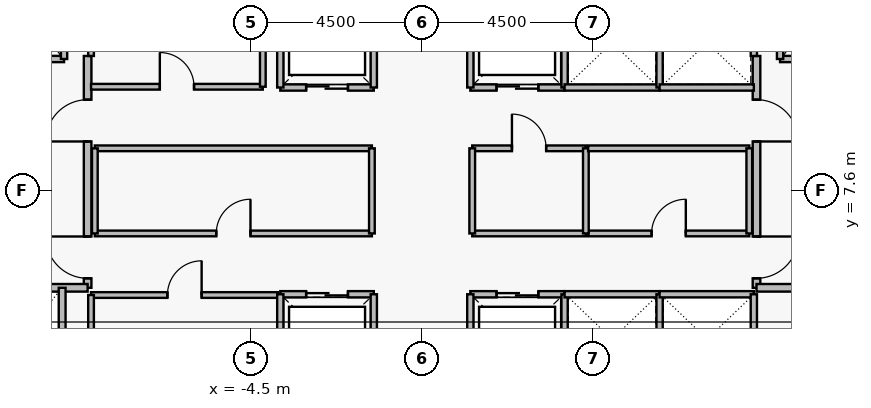
"""IFC4 building model, lengths in metres.
Left out: names, types, materials, properties, quantities, classifications, styles, units other than length and angle.
Written with IfcOpenShell. Run it as: python <this file> out.ifc"""

import sys

from ifc_helpers import new_model, si_unit, direction, frame, frame_2d, origin, place, context, subcontext, project, spatial, rectangle, extrude, element, fill, save


model = new_model("IFC4")
c1 = context("Model", 3, precision=1e-05, world=origin(), true_north=direction((0.0, 1.0)))
c2 = subcontext(c1, "Body", "Model", "MODEL_VIEW")
j1 = project(units=[si_unit("LENGTHUNIT", "METRE"), si_unit("PLANEANGLEUNIT", "RADIAN")], contexts=[c1])
p1 = place(None, origin())
s1 = spatial("IfcSite", under=j1, at=p1, CompositionType="ELEMENT")
p2 = place(p1, origin())
s2 = spatial("IfcBuilding", under=s1, at=p2, CompositionType="ELEMENT")
p3 = place(p2, frame((0.0, 0.0, 214.9)))
s3 = spatial("IfcBuildingStorey", under=s2, at=p3, CompositionType="ELEMENT", Elevation=214.9)
p4 = place(p3, frame((-8.8, 5.05, 0.0), z_axis=(0.0, 0.0, 1.0), x_axis=(0.0, 1.0, 0.0)))
e1 = element("IfcWall", 1, at=p4, inside=s3, PredefinedType="PARTITIONING", context=c2, shape_type="SweptSolid", body=[
    extrude(rectangle(XDim=6.1, YDim=0.2, at=frame_2d((3.05, 0.0))), origin(), (0.0, 0.0, 1.0), 3.53),
])
p5 = place(p4, frame((0.25, 0.0, 0.0)))
e2 = element("IfcOpeningElement", 2, at=p5, cuts=e1, PredefinedType="OPENING", context=c2, shape_type="SweptSolid", body=[
    extrude(rectangle(XDim=1.1, YDim=2.2, at=frame_2d((0.55, 1.1))), frame((0.0, 0.11, 0.0), z_axis=(0.0, -1.0, 0.0), x_axis=(1.0, 0.0, 0.0)), (0.0, 0.0, 1.0), 0.22),
])
p6 = place(p4, frame((3.85, 0.0, 0.0)))
e3 = element("IfcOpeningElement", 3, at=p6, cuts=e1, PredefinedType="OPENING", context=c2, shape_type="SweptSolid", body=[
    extrude(rectangle(XDim=1.1, YDim=2.2, at=frame_2d((0.55, 1.1))), frame((0.0, 0.11, 0.0), z_axis=(0.0, -1.0, 0.0), x_axis=(1.0, 0.0, 0.0)), (0.0, 0.0, 1.0), 0.22),
])
p7 = place(p3, frame((8.8, 11.15, 0.0), z_axis=(0.0, 0.0, 1.0), x_axis=(0.0, -1.0, 0.0)))
e4 = element("IfcWall", 4, at=p7, inside=s3, PredefinedType="PARTITIONING", context=c2, shape_type="SweptSolid", body=[
    extrude(rectangle(XDim=6.1, YDim=0.2, at=frame_2d((3.05, 0.0))), origin(), (0.0, 0.0, 1.0), 3.53),
])
p8 = place(p7, frame((1.15, 0.0, 0.0)))
e5 = element("IfcOpeningElement", 5, at=p8, cuts=e4, PredefinedType="OPENING", context=c2, shape_type="SweptSolid", body=[
    extrude(rectangle(XDim=1.1, YDim=2.2, at=frame_2d((0.55, 1.1))), frame((0.0, 0.11, 0.0), z_axis=(0.0, -1.0, 0.0), x_axis=(1.0, 0.0, 0.0)), (0.0, 0.0, 1.0), 0.22),
])
p9 = place(p7, frame((4.75, 0.0, 0.0)))
e6 = element("IfcOpeningElement", 6, at=p9, cuts=e4, PredefinedType="OPENING", context=c2, shape_type="SweptSolid", body=[
    extrude(rectangle(XDim=1.1, YDim=2.2, at=frame_2d((0.55, 1.1))), frame((0.0, 0.11, 0.0), z_axis=(0.0, -1.0, 0.0), x_axis=(1.0, 0.0, 0.0)), (0.0, 0.0, 1.0), 0.22),
])
p10 = place(p3, frame((-11.58, 11.07, 0.0), z_axis=(0.0, 0.0, 1.0), x_axis=(1.0, 0.0, 0.0)))
e7 = element("IfcWall", 7, at=p10, inside=s3, PredefinedType="PARTITIONING", context=c2, shape_type="SweptSolid", body=[
    extrude(rectangle(XDim=2.16, YDim=0.165, at=frame_2d((1.08, 0.0))), origin(), (0.0, 0.0, 1.0), 3.53),
])
p11 = place(p10, frame((0.53, 0.0, 0.0)))
e8 = element("IfcOpeningElement", 8, at=p11, cuts=e7, PredefinedType="OPENING", context=c2, shape_type="SweptSolid", body=[
    extrude(rectangle(XDim=1.15, YDim=2.25, at=frame_2d((0.575, 1.125))), frame((0.0, 0.093, 0.0), z_axis=(0.0, -1.0, 0.0), x_axis=(1.0, 0.0, 0.0)), (0.0, 0.0, 1.0), 0.185),
])
p12 = place(p3, frame((9.42, 11.07, 0.0), z_axis=(0.0, 0.0, 1.0), x_axis=(1.0, 0.0, 0.0)))
e9 = element("IfcWall", 9, at=p12, inside=s3, PredefinedType="PARTITIONING", context=c2, shape_type="SweptSolid", body=[
    extrude(rectangle(XDim=2.16, YDim=0.165, at=frame_2d((1.08, 0.0))), origin(), (0.0, 0.0, 1.0), 3.53),
])
p13 = place(p12, frame((0.53, 0.0, 0.0)))
e10 = element("IfcOpeningElement", 10, at=p13, cuts=e9, PredefinedType="OPENING", context=c2, shape_type="SweptSolid", body=[
    extrude(rectangle(XDim=1.15, YDim=2.25, at=frame_2d((0.575, 1.125))), frame((0.0, 0.093, 0.0), z_axis=(0.0, -1.0, 0.0), x_axis=(1.0, 0.0, 0.0)), (0.0, 0.0, 1.0), 0.185),
])
p14 = place(p3, frame((-3.73, 4.88, 0.0), z_axis=(0.0, 0.0, 1.0), x_axis=(1.0, 0.0, 0.0)))
e11 = element("IfcWall", 11, at=p14, inside=s3, PredefinedType="PARTITIONING", context=c2, shape_type="SweptSolid", body=[
    extrude(rectangle(XDim=2.46, YDim=0.165, at=frame_2d((1.23, 0.0))), origin(), (0.0, 0.0, 1.0), 3.53),
])
p15 = place(p14, frame((0.68, 0.0, 0.0)))
e12 = element("IfcOpeningElement", 12, at=p15, cuts=e11, PredefinedType="OPENING", context=c2, shape_type="SweptSolid", body=[
    extrude(rectangle(XDim=1.1, YDim=2.25, at=frame_2d((0.55, 1.125))), frame((0.0, 0.093, 0.0), z_axis=(0.0, -1.0, 0.0), x_axis=(1.0, 0.0, 0.0)), (0.0, 0.0, 1.0), 0.185),
])
p16 = place(p3, frame((1.27, 4.88, 0.0), z_axis=(0.0, 0.0, 1.0), x_axis=(1.0, 0.0, 0.0)))
e13 = element("IfcWall", 13, at=p16, inside=s3, PredefinedType="PARTITIONING", context=c2, shape_type="SweptSolid", body=[
    extrude(rectangle(XDim=2.48, YDim=0.165, at=frame_2d((1.24, 0.0))), origin(), (0.0, 0.0, 1.0), 3.53),
])
p17 = place(p16, frame((0.69, 0.0, 0.0)))
e14 = element("IfcOpeningElement", 14, at=p17, cuts=e13, PredefinedType="OPENING", context=c2, shape_type="SweptSolid", body=[
    extrude(rectangle(XDim=1.1, YDim=2.25, at=frame_2d((0.55, 1.125))), frame((0.0, 0.093, 0.0), z_axis=(0.0, -1.0, 0.0), x_axis=(1.0, 0.0, 0.0)), (0.0, 0.0, 1.0), 0.185),
])
p18 = place(p3, frame((-3.73, 10.32, 0.0), z_axis=(0.0, 0.0, 1.0), x_axis=(1.0, 0.0, 0.0)))
e15 = element("IfcWall", 15, at=p18, inside=s3, PredefinedType="PARTITIONING", context=c2, shape_type="SweptSolid", body=[
    extrude(rectangle(XDim=2.46, YDim=0.165, at=frame_2d((1.23, 0.0))), origin(), (0.0, 0.0, 1.0), 3.53),
])
p19 = place(p18, frame((0.68, 0.0, 0.0)))
e16 = element("IfcOpeningElement", 16, at=p19, cuts=e15, PredefinedType="OPENING", context=c2, shape_type="SweptSolid", body=[
    extrude(rectangle(XDim=1.1, YDim=2.25, at=frame_2d((0.55, 1.125))), frame((0.0, 0.093, 0.0), z_axis=(0.0, -1.0, 0.0), x_axis=(1.0, 0.0, 0.0)), (0.0, 0.0, 1.0), 0.185),
])
p20 = place(p3, frame((1.27, 10.32, 0.0), z_axis=(0.0, 0.0, 1.0), x_axis=(1.0, 0.0, 0.0)))
e17 = element("IfcWall", 17, at=p20, inside=s3, PredefinedType="PARTITIONING", context=c2, shape_type="SweptSolid", body=[
    extrude(rectangle(XDim=2.48, YDim=0.165, at=frame_2d((1.24, 0.0))), origin(), (0.0, 0.0, 1.0), 3.53),
])
p21 = place(p20, frame((0.69, 0.0, 0.0)))
e18 = element("IfcOpeningElement", 18, at=p21, cuts=e17, PredefinedType="OPENING", context=c2, shape_type="SweptSolid", body=[
    extrude(rectangle(XDim=1.1, YDim=2.25, at=frame_2d((0.55, 1.125))), frame((0.0, 0.093, 0.0), z_axis=(0.0, -1.0, 0.0), x_axis=(1.0, 0.0, 0.0)), (0.0, 0.0, 1.0), 0.185),
])
p22 = place(p3, frame((-8.71, 4.86, 0.0), z_axis=(0.0, 0.0, 1.0), x_axis=(1.0, 0.0, 0.0)))
e19 = element("IfcWall", 19, at=p22, inside=s3, PredefinedType="PARTITIONING", context=c2, shape_type="SweptSolid", body=[
    extrude(rectangle(XDim=4.92, YDim=0.15, at=frame_2d((2.46, 0.0))), origin(), (0.0, 0.0, 1.0), 3.53),
])
p23 = place(p22, frame((2.01, 0.0, 0.0)))
e20 = element("IfcOpeningElement", 20, at=p23, cuts=e19, PredefinedType="OPENING", context=c2, shape_type="SweptSolid", body=[
    extrude(rectangle(XDim=0.9, YDim=2.15, at=frame_2d((0.45, 1.075))), frame((0.0, 0.085, 0.0), z_axis=(0.0, -1.0, 0.0), x_axis=(1.0, 0.0, 0.0)), (0.0, 0.0, 1.0), 0.17),
])
p24 = place(p3, frame((-8.71, 10.34, 0.0), z_axis=(0.0, 0.0, 1.0), x_axis=(1.0, 0.0, 0.0)))
e21 = element("IfcWall", 21, at=p24, inside=s3, PredefinedType="PARTITIONING", context=c2, shape_type="SweptSolid", body=[
    extrude(rectangle(XDim=4.52, YDim=0.15, at=frame_2d((2.26, 0.0))), origin(), (0.0, 0.0, 1.0), 3.53),
])
p25 = place(p24, frame((1.81, 0.0, 0.0)))
e22 = element("IfcOpeningElement", 22, at=p25, cuts=e21, PredefinedType="OPENING", context=c2, shape_type="SweptSolid", body=[
    extrude(rectangle(XDim=0.9, YDim=2.15, at=frame_2d((0.45, 1.075))), frame((0.0, 0.085, 0.0), z_axis=(0.0, -1.0, 0.0), x_axis=(1.0, 0.0, 0.0)), (0.0, 0.0, 1.0), 0.17),
])
p26 = place(p3, frame((-8.61, 6.48, 0.0), z_axis=(0.0, 0.0, 1.0), x_axis=(1.0, 0.0, 0.0)))
e23 = element("IfcWall", 23, at=p26, inside=s3, PredefinedType="PARTITIONING", context=c2, shape_type="SweptSolid", body=[
    extrude(rectangle(XDim=7.29, YDim=0.15, at=frame_2d((3.645, 0.0))), origin(), (0.0, 0.0, 1.0), 3.53),
])
p27 = place(p26, frame((3.195, 0.0, 0.0)))
e24 = element("IfcOpeningElement", 24, at=p27, cuts=e23, PredefinedType="OPENING", context=c2, shape_type="SweptSolid", body=[
    extrude(rectangle(XDim=0.9, YDim=2.15, at=frame_2d((0.45, 1.075))), frame((0.0, 0.085, 0.0), z_axis=(0.0, -1.0, 0.0), x_axis=(1.0, 0.0, 0.0)), (0.0, 0.0, 1.0), 0.17),
])
p28 = place(p3, frame((1.32, 8.72, 0.0), z_axis=(0.0, 0.0, 1.0), x_axis=(1.0, 0.0, 0.0)))
e25 = element("IfcWall", 25, at=p28, inside=s3, PredefinedType="PARTITIONING", context=c2, shape_type="SweptSolid", body=[
    extrude(rectangle(XDim=2.99, YDim=0.15, at=frame_2d((1.495, 0.0))), origin(), (0.0, 0.0, 1.0), 3.53),
])
p29 = place(p28, frame((1.045, 0.0, 0.0)))
e26 = element("IfcOpeningElement", 26, at=p29, cuts=e25, PredefinedType="OPENING", context=c2, shape_type="SweptSolid", body=[
    extrude(rectangle(XDim=0.9, YDim=2.15, at=frame_2d((0.45, 1.075))), frame((0.0, 0.085, 0.0), z_axis=(0.0, -1.0, 0.0), x_axis=(1.0, 0.0, 0.0)), (0.0, 0.0, 1.0), 0.17),
])
p30 = place(p3, frame((4.37, 6.48, 0.0), z_axis=(0.0, 0.0, 1.0), x_axis=(1.0, 0.0, 0.0)))
e27 = element("IfcWall", 27, at=p30, inside=s3, PredefinedType="PARTITIONING", context=c2, shape_type="SweptSolid", body=[
    extrude(rectangle(XDim=4.24, YDim=0.15, at=frame_2d((2.12, 0.0))), origin(), (0.0, 0.0, 1.0), 3.53),
])
p31 = place(p30, frame((1.67, 0.0, 0.0)))
e28 = element("IfcOpeningElement", 28, at=p31, cuts=e27, PredefinedType="OPENING", context=c2, shape_type="SweptSolid", body=[
    extrude(rectangle(XDim=0.9, YDim=2.15, at=frame_2d((0.45, 1.075))), frame((0.0, 0.085, 0.0), z_axis=(0.0, -1.0, 0.0), x_axis=(1.0, 0.0, 0.0)), (0.0, 0.0, 1.0), 0.17),
])
for number, where, z_axis, x_axis in (
    (29, (-11.65, 5.05, 0.0), (0.0, 0.0, 1.0), (1.0, 0.0, 0.0)),
    (30, (8.8, 5.05, 0.0), (0.0, 0.0, 1.0), (1.0, 0.0, 0.0)),
):
    element("IfcWall", number, at=place(p3, frame(where, z_axis=z_axis, x_axis=x_axis)), inside=s3, PredefinedType="PARTITIONING", context=c2, shape_type="SweptSolid", body=[
        extrude(rectangle(XDim=2.85, YDim=0.2, at=frame_2d((1.425, 0.0))), origin(), (0.0, 0.0, 1.0), 3.53),
    ])
for number, where, z_axis, x_axis in (
    (31, (-9.42, 11.07, 0.0), (0.0, 0.0, 1.0), (0.0, 1.0, 0.0)),
    (32, (9.42, 11.07, 0.0), (0.0, 0.0, 1.0), (0.0, 1.0, 0.0)),
):
    element("IfcWall", number, at=place(p3, frame(where, z_axis=z_axis, x_axis=x_axis)), inside=s3, PredefinedType="PARTITIONING", context=c2, shape_type="SweptSolid", body=[
        extrude(rectangle(XDim=2.96, YDim=0.165, at=frame_2d((1.48, 0.0))), origin(), (0.0, 0.0, 1.0), 3.53),
    ])
for number, where, z_axis, x_axis in (
    (33, (-3.73, 2.52, 0.0), (0.0, 0.0, 1.0), (0.0, 1.0, 0.0)),
    (34, (-1.27, 2.52, 0.0), (0.0, 0.0, 1.0), (0.0, 1.0, 0.0)),
    (35, (1.27, 2.52, 0.0), (0.0, 0.0, 1.0), (0.0, 1.0, 0.0)),
    (36, (3.75, 2.52, 0.0), (0.0, 0.0, 1.0), (0.0, 1.0, 0.0)),
    (37, (-3.73, 10.32, 0.0), (0.0, 0.0, 1.0), (0.0, 1.0, 0.0)),
    (38, (-1.27, 10.32, 0.0), (0.0, 0.0, 1.0), (0.0, 1.0, 0.0)),
    (39, (1.27, 10.32, 0.0), (0.0, 0.0, 1.0), (0.0, 1.0, 0.0)),
    (40, (3.75, 10.32, 0.0), (0.0, 0.0, 1.0), (0.0, 1.0, 0.0)),
):
    element("IfcWall", number, at=place(p3, frame(where, z_axis=z_axis, x_axis=x_axis)), inside=s3, PredefinedType="PARTITIONING", context=c2, shape_type="SweptSolid", body=[
        extrude(rectangle(XDim=2.36, YDim=0.165, at=frame_2d((1.18, 0.0))), origin(), (0.0, 0.0, 1.0), 3.53),
    ])
p32 = place(p3, frame((3.75, 4.88, 0.0), z_axis=(0.0, 0.0, 1.0), x_axis=(1.0, 0.0, 0.0)))
e41 = element("IfcWall", 41, at=p32, inside=s3, PredefinedType="PARTITIONING", context=c2, shape_type="SweptSolid", body=[
    extrude(rectangle(XDim=2.5, YDim=0.165, at=frame_2d((1.25, 0.0))), origin(), (0.0, 0.0, 1.0), 3.53),
])
p33 = place(p3, frame((6.25, 2.52, 0.0), z_axis=(0.0, 0.0, 1.0), x_axis=(0.0, 1.0, 0.0)))
e42 = element("IfcWall", 42, at=p33, inside=s3, PredefinedType="PARTITIONING", context=c2, shape_type="SweptSolid", body=[
    extrude(rectangle(XDim=2.36, YDim=0.165, at=frame_2d((1.18, 0.0))), origin(), (0.0, 0.0, 1.0), 3.53),
])
p34 = place(p3, frame((6.25, 4.88, 0.0), z_axis=(0.0, 0.0, 1.0), x_axis=(1.0, 0.0, 0.0)))
e43 = element("IfcWall", 43, at=p34, inside=s3, PredefinedType="PARTITIONING", context=c2, shape_type="SweptSolid", body=[
    extrude(rectangle(XDim=2.48, YDim=0.165, at=frame_2d((1.24, 0.0))), origin(), (0.0, 0.0, 1.0), 3.53),
])
p35 = place(p3, frame((8.73, 2.52, 0.0), z_axis=(0.0, 0.0, 1.0), x_axis=(0.0, 1.0, 0.0)))
e44 = element("IfcWall", 44, at=p35, inside=s3, PredefinedType="PARTITIONING", context=c2, shape_type="SweptSolid", body=[
    extrude(rectangle(XDim=2.36, YDim=0.165, at=frame_2d((1.18, 0.0))), origin(), (0.0, 0.0, 1.0), 3.53),
])
p36 = place(p3, frame((3.75, 10.32, 0.0), z_axis=(0.0, 0.0, 1.0), x_axis=(1.0, 0.0, 0.0)))
e45 = element("IfcWall", 45, at=p36, inside=s3, PredefinedType="PARTITIONING", context=c2, shape_type="SweptSolid", body=[
    extrude(rectangle(XDim=2.5, YDim=0.165, at=frame_2d((1.25, 0.0))), origin(), (0.0, 0.0, 1.0), 3.53),
])
p37 = place(p3, frame((6.25, 10.32, 0.0), z_axis=(0.0, 0.0, 1.0), x_axis=(0.0, 1.0, 0.0)))
e46 = element("IfcWall", 46, at=p37, inside=s3, PredefinedType="PARTITIONING", context=c2, shape_type="SweptSolid", body=[
    extrude(rectangle(XDim=2.36, YDim=0.165, at=frame_2d((1.18, 0.0))), origin(), (0.0, 0.0, 1.0), 3.53),
])
p38 = place(p3, frame((6.25, 10.32, 0.0), z_axis=(0.0, 0.0, 1.0), x_axis=(1.0, 0.0, 0.0)))
e47 = element("IfcWall", 47, at=p38, inside=s3, PredefinedType="PARTITIONING", context=c2, shape_type="SweptSolid", body=[
    extrude(rectangle(XDim=2.48, YDim=0.165, at=frame_2d((1.24, 0.0))), origin(), (0.0, 0.0, 1.0), 3.53),
])
p39 = place(p3, frame((8.73, 11.15, 0.0), z_axis=(0.0, 0.0, 1.0), x_axis=(0.0, 1.0, 0.0)))
e48 = element("IfcWall", 48, at=p39, inside=s3, PredefinedType="PARTITIONING", context=c2, shape_type="SweptSolid", body=[
    extrude(rectangle(XDim=1.53, YDim=0.165, at=frame_2d((0.765, 0.0))), origin(), (0.0, 0.0, 1.0), 3.53),
])
p40 = place(p3, frame((-8.71, 2.49, 0.0), z_axis=(0.0, 0.0, 1.0), x_axis=(0.0, 1.0, 0.0)))
e49 = element("IfcWall", 49, at=p40, inside=s3, PredefinedType="PARTITIONING", context=c2, shape_type="SweptSolid", body=[
    extrude(rectangle(XDim=2.37, YDim=0.15, at=frame_2d((1.185, 0.0))), origin(), (0.0, 0.0, 1.0), 3.53),
])
p41 = place(p3, frame((-8.71, 11.15, 0.0), z_axis=(0.0, 0.0, 1.0), x_axis=(0.0, 1.0, 0.0)))
e50 = element("IfcWall", 50, at=p41, inside=s3, PredefinedType="PARTITIONING", context=c2, shape_type="SweptSolid", body=[
    extrude(rectangle(XDim=1.71, YDim=0.15, at=frame_2d((0.855, 0.0))), origin(), (0.0, 0.0, 1.0), 3.53),
])
p42 = place(p3, frame((-4.19, 10.34, 0.0), z_axis=(0.0, 0.0, 1.0), x_axis=(0.0, 1.0, 0.0)))
e51 = element("IfcWall", 51, at=p42, inside=s3, PredefinedType="PARTITIONING", context=c2, shape_type="SweptSolid", body=[
    extrude(rectangle(XDim=2.52, YDim=0.15, at=frame_2d((1.26, 0.0))), origin(), (0.0, 0.0, 1.0), 3.53),
])
p43 = place(p3, frame((-9.47, 2.45, 0.0), z_axis=(0.0, 0.0, 1.0), x_axis=(0.0, 1.0, 0.0)))
e52 = element("IfcWall", 52, at=p43, inside=s3, PredefinedType="PARTITIONING", context=c2, shape_type="SweptSolid", body=[
    extrude(rectangle(XDim=2.6, YDim=0.18, at=frame_2d((1.3, 0.0))), origin(), (0.0, 0.0, 1.0), 3.53),
])
p44 = place(p3, frame((-8.61, 8.72, 0.0), z_axis=(0.0, 0.0, 1.0), x_axis=(1.0, 0.0, 0.0)))
e53 = element("IfcWall", 53, at=p44, inside=s3, PredefinedType="PARTITIONING", context=c2, shape_type="SweptSolid", body=[
    extrude(rectangle(XDim=7.29, YDim=0.15, at=frame_2d((3.645, 0.0))), origin(), (0.0, 0.0, 1.0), 3.53),
])
for number, where, z_axis, x_axis in (
    (54, (-8.61, 6.48, 0.0), (0.0, 0.0, 1.0), (0.0, 1.0, 0.0)),
    (55, (-1.32, 6.48, 0.0), (0.0, 0.0, 1.0), (0.0, 1.0, 0.0)),
):
    element("IfcWall", number, at=place(p3, frame(where, z_axis=z_axis, x_axis=x_axis)), inside=s3, PredefinedType="PARTITIONING", context=c2, shape_type="SweptSolid", body=[
        extrude(rectangle(XDim=2.24, YDim=0.15, at=frame_2d((1.12, 0.0))), origin(), (0.0, 0.0, 1.0), 3.53),
    ])
p45 = place(p3, frame((1.32, 6.48, 0.0), z_axis=(0.0, 0.0, 1.0), x_axis=(1.0, 0.0, 0.0)))
e56 = element("IfcWall", 56, at=p45, inside=s3, PredefinedType="PARTITIONING", context=c2, shape_type="SweptSolid", body=[
    extrude(rectangle(XDim=2.99, YDim=0.15, at=frame_2d((1.495, 0.0))), origin(), (0.0, 0.0, 1.0), 3.53),
])
for number, where, z_axis, x_axis in (
    (57, (1.32, 6.48, 0.0), (0.0, 0.0, 1.0), (0.0, 1.0, 0.0)),
    (58, (4.31, 6.48, 0.0), (0.0, 0.0, 1.0), (0.0, 1.0, 0.0)),
):
    element("IfcWall", number, at=place(p3, frame(where, z_axis=z_axis, x_axis=x_axis)), inside=s3, PredefinedType="PARTITIONING", context=c2, shape_type="SweptSolid", body=[
        extrude(rectangle(XDim=2.24, YDim=0.15, at=frame_2d((1.12, 0.0))), origin(), (0.0, 0.0, 1.0), 3.53),
    ])
p46 = place(p3, frame((4.37, 8.72, 0.0), z_axis=(0.0, 0.0, 1.0), x_axis=(1.0, 0.0, 0.0)))
e59 = element("IfcWall", 59, at=p46, inside=s3, PredefinedType="PARTITIONING", context=c2, shape_type="SweptSolid", body=[
    extrude(rectangle(XDim=4.24, YDim=0.15, at=frame_2d((2.12, 0.0))), origin(), (0.0, 0.0, 1.0), 3.53),
])
p47 = place(p3, frame((8.61, 6.48, 0.0), z_axis=(0.0, 0.0, 1.0), x_axis=(0.0, 1.0, 0.0)))
e60 = element("IfcWall", 60, at=p47, inside=s3, PredefinedType="PARTITIONING", context=c2, shape_type="SweptSolid", body=[
    extrude(rectangle(XDim=2.24, YDim=0.15, at=frame_2d((1.12, 0.0))), origin(), (0.0, 0.0, 1.0), 3.53),
])
p48 = place(p5, origin())
e61 = element("IfcDoor", 61, at=p48, inside=s3, OperationType="SINGLE_SWING_RIGHT", PredefinedType="DOOR", context=c2, shape_type="SweptSolid", body=[
    extrude(rectangle(XDim=1.1, YDim=2.2, at=frame_2d((0.55, 1.1))), frame((0.0, 0.025, 0.0), z_axis=(0.0, -1.0, 0.0), x_axis=(1.0, 0.0, 0.0)), (0.0, 0.0, 1.0), 0.05),
])
fill(e2, e61)
p49 = place(p6, origin())
e62 = element("IfcDoor", 62, at=p49, inside=s3, OperationType="SINGLE_SWING_LEFT", PredefinedType="DOOR", context=c2, shape_type="SweptSolid", body=[
    extrude(rectangle(XDim=1.1, YDim=2.2, at=frame_2d((0.55, 1.1))), frame((0.0, 0.025, 0.0), z_axis=(0.0, -1.0, 0.0), x_axis=(1.0, 0.0, 0.0)), (0.0, 0.0, 1.0), 0.05),
])
fill(e3, e62)
p50 = place(p8, origin())
e63 = element("IfcDoor", 63, at=p50, inside=s3, OperationType="SINGLE_SWING_RIGHT", PredefinedType="DOOR", context=c2, shape_type="SweptSolid", body=[
    extrude(rectangle(XDim=1.1, YDim=2.2, at=frame_2d((0.55, 1.1))), frame((0.0, 0.025, 0.0), z_axis=(0.0, -1.0, 0.0), x_axis=(1.0, 0.0, 0.0)), (0.0, 0.0, 1.0), 0.05),
])
fill(e5, e63)
p51 = place(p9, origin())
e64 = element("IfcDoor", 64, at=p51, inside=s3, OperationType="SINGLE_SWING_LEFT", PredefinedType="DOOR", context=c2, shape_type="SweptSolid", body=[
    extrude(rectangle(XDim=1.1, YDim=2.2, at=frame_2d((0.55, 1.1))), frame((0.0, 0.025, 0.0), z_axis=(0.0, -1.0, 0.0), x_axis=(1.0, 0.0, 0.0)), (0.0, 0.0, 1.0), 0.05),
])
fill(e6, e64)
p52 = place(p15, origin())
e65 = element("IfcDoor", 65, at=p52, inside=s3, OperationType="SLIDING_TO_LEFT", PredefinedType="DOOR", context=c2, shape_type="SweptSolid", body=[
    extrude(rectangle(XDim=1.1, YDim=2.25, at=frame_2d((0.55, 1.125))), frame((0.0, 0.025, 0.0), z_axis=(0.0, -1.0, 0.0), x_axis=(1.0, 0.0, 0.0)), (0.0, 0.0, 1.0), 0.05),
])
fill(e12, e65)
p53 = place(p17, origin())
e66 = element("IfcDoor", 66, at=p53, inside=s3, OperationType="SLIDING_TO_LEFT", PredefinedType="DOOR", context=c2, shape_type="SweptSolid", body=[
    extrude(rectangle(XDim=1.1, YDim=2.25, at=frame_2d((0.55, 1.125))), frame((0.0, 0.025, 0.0), z_axis=(0.0, -1.0, 0.0), x_axis=(1.0, 0.0, 0.0)), (0.0, 0.0, 1.0), 0.05),
])
fill(e14, e66)
p54 = place(p19, origin())
e67 = element("IfcDoor", 67, at=p54, inside=s3, OperationType="SLIDING_TO_LEFT", PredefinedType="DOOR", context=c2, shape_type="SweptSolid", body=[
    extrude(rectangle(XDim=1.1, YDim=2.25, at=frame_2d((0.55, 1.125))), frame((0.0, 0.025, 0.0), z_axis=(0.0, -1.0, 0.0), x_axis=(1.0, 0.0, 0.0)), (0.0, 0.0, 1.0), 0.05),
])
fill(e16, e67)
p55 = place(p21, origin())
e68 = element("IfcDoor", 68, at=p55, inside=s3, OperationType="SLIDING_TO_LEFT", PredefinedType="DOOR", context=c2, shape_type="SweptSolid", body=[
    extrude(rectangle(XDim=1.1, YDim=2.25, at=frame_2d((0.55, 1.125))), frame((0.0, 0.025, 0.0), z_axis=(0.0, -1.0, 0.0), x_axis=(1.0, 0.0, 0.0)), (0.0, 0.0, 1.0), 0.05),
])
fill(e18, e68)
p56 = place(p23, origin())
e69 = element("IfcDoor", 69, at=p56, inside=s3, OperationType="SINGLE_SWING_RIGHT", PredefinedType="DOOR", context=c2, shape_type="SweptSolid", body=[
    extrude(rectangle(XDim=0.9, YDim=2.15, at=frame_2d((0.45, 1.075))), frame((0.0, 0.025, 0.0), z_axis=(0.0, -1.0, 0.0), x_axis=(1.0, 0.0, 0.0)), (0.0, 0.0, 1.0), 0.05),
])
fill(e20, e69)
p57 = place(p25, origin())
e70 = element("IfcDoor", 70, at=p57, inside=s3, OperationType="SINGLE_SWING_LEFT", PredefinedType="DOOR", context=c2, shape_type="SweptSolid", body=[
    extrude(rectangle(XDim=0.9, YDim=2.15, at=frame_2d((0.45, 1.075))), frame((0.0, 0.025, 0.0), z_axis=(0.0, -1.0, 0.0), x_axis=(1.0, 0.0, 0.0)), (0.0, 0.0, 1.0), 0.05),
])
fill(e22, e70)
p58 = place(p27, origin())
e71 = element("IfcDoor", 71, at=p58, inside=s3, OperationType="SINGLE_SWING_RIGHT", PredefinedType="DOOR", context=c2, shape_type="SweptSolid", body=[
    extrude(rectangle(XDim=0.9, YDim=2.15, at=frame_2d((0.45, 1.075))), frame((0.0, 0.025, 0.0), z_axis=(0.0, -1.0, 0.0), x_axis=(1.0, 0.0, 0.0)), (0.0, 0.0, 1.0), 0.05),
])
fill(e24, e71)
p59 = place(p29, origin())
e72 = element("IfcDoor", 72, at=p59, inside=s3, OperationType="SINGLE_SWING_LEFT", PredefinedType="DOOR", context=c2, shape_type="SweptSolid", body=[
    extrude(rectangle(XDim=0.9, YDim=2.15, at=frame_2d((0.45, 1.075))), frame((0.0, 0.025, 0.0), z_axis=(0.0, -1.0, 0.0), x_axis=(1.0, 0.0, 0.0)), (0.0, 0.0, 1.0), 0.05),
])
fill(e26, e72)
p60 = place(p31, origin())
e73 = element("IfcDoor", 73, at=p60, inside=s3, OperationType="SINGLE_SWING_RIGHT", PredefinedType="DOOR", context=c2, shape_type="SweptSolid", body=[
    extrude(rectangle(XDim=0.9, YDim=2.15, at=frame_2d((0.45, 1.075))), frame((0.0, 0.025, 0.0), z_axis=(0.0, -1.0, 0.0), x_axis=(1.0, 0.0, 0.0)), (0.0, 0.0, 1.0), 0.05),
])
fill(e28, e73)
save(model, sys.argv[1])
